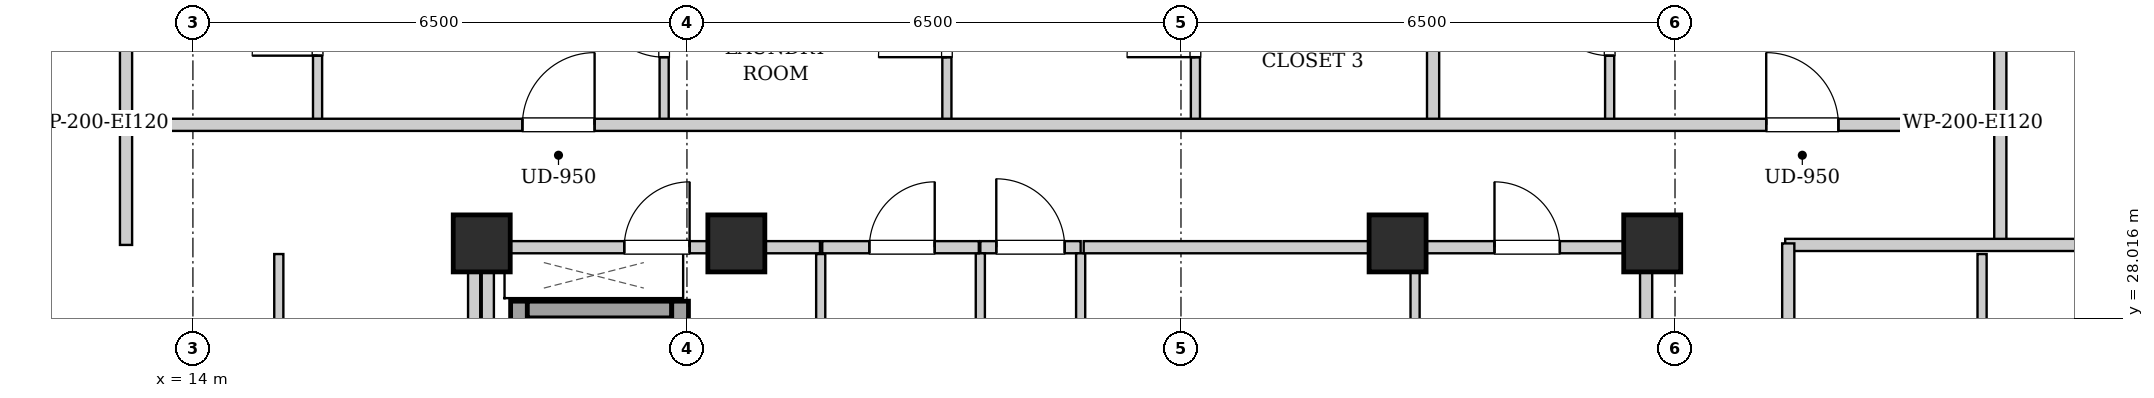
"""IFC4 building model, lengths in metres.
Left out: names, types, materials, properties, quantities, classifications, styles, units other than length and angle.
Written with IfcOpenShell. Run it as: python <this file> out.ifc"""

import sys

from ifc_helpers import new_model, si_unit, direction, frame, frame_2d, origin, origin_2d, place, context, subcontext, project, spatial, rectangle, extrude, element, fill, save


model = new_model("IFC4")
c1 = context("Model", 3, precision=1e-05, world=origin(), true_north=direction((0.0, 1.0)))
c2 = subcontext(c1, "Body", "Model", "MODEL_VIEW")
j1 = project(units=[si_unit("LENGTHUNIT", "METRE"), si_unit("PLANEANGLEUNIT", "RADIAN")], contexts=[c1])
p1 = place(None, origin())
s1 = spatial("IfcSite", under=j1, at=p1, CompositionType="ELEMENT")
p2 = place(p1, origin())
s2 = spatial("IfcBuilding", under=s1, at=p2, CompositionType="ELEMENT")
p3 = place(p2, frame((0.0, 0.0, 224.1)))
s3 = spatial("IfcBuildingStorey", under=s2, at=p3, CompositionType="ELEMENT", Elevation=224.1)
for number, where, z_axis, x_axis in (
    (1, (17.8, 29.0, 0.0), (0.0, 0.0, 1.0), (1.0, 0.0, 0.0)),
    (2, (21.15, 29.0, 0.0), (0.0, 0.0, 1.0), (1.0, 0.0, 0.0)),
    (3, (29.85, 29.0, 0.0), (0.0, 0.0, 1.0), (1.0, 0.0, 0.0)),
    (4, (33.2, 29.0, 0.0), (0.0, 0.0, 1.0), (1.0, 0.0, 0.0)),
):
    element("IfcColumn", number, at=place(p3, frame(where, z_axis=z_axis, x_axis=x_axis)), inside=s3, PredefinedType="COLUMN", context=c2, shape_type="SweptSolid", body=[
        extrude(rectangle(XDim=0.75, YDim=0.75, at=origin_2d()), origin(), (0.0, 0.0, 1.0), 3.4),
    ])
p4 = place(p3, frame((18.29, 24.1, 0.0), z_axis=(0.0, 0.0, 1.0), x_axis=(0.0, 1.0, 0.0)))
e5 = element("IfcWall", 5, at=p4, inside=s3, PredefinedType="SHEAR", context=c2, shape_type="SweptSolid", body=[
    extrude(rectangle(XDim=4.14, YDim=0.22, at=frame_2d((2.07, 0.0))), origin(), (0.0, 0.0, 1.0), 3.14),
])
p5 = place(p3, frame((18.4, 28.13, 0.0), z_axis=(0.0, 0.0, 1.0), x_axis=(1.0, 0.0, 0.0)))
e6 = element("IfcWall", 6, at=p5, inside=s3, PredefinedType="SHEAR", context=c2, shape_type="SweptSolid", body=[
    extrude(rectangle(XDim=1.9, YDim=0.22, at=frame_2d((0.95, 0.0))), origin(), (0.0, 0.0, 1.0), 3.14),
])
p6 = place(p3, frame((20.41, 26.06, 0.0), z_axis=(0.0, 0.0, 1.0), x_axis=(0.0, 1.0, 0.0)))
e7 = element("IfcWall", 7, at=p6, inside=s3, PredefinedType="SHEAR", context=c2, shape_type="SweptSolid", body=[
    extrude(rectangle(XDim=2.18, YDim=0.22, at=frame_2d((1.09, 0.0))), origin(), (0.0, 0.0, 1.0), 3.14),
])
p7 = place(p6, frame((0.54, 0.0, 0.0)))
e8 = element("IfcOpeningElement", 8, at=p7, cuts=e7, PredefinedType="OPENING", context=c2, shape_type="SweptSolid", body=[
    extrude(rectangle(XDim=1.1, YDim=2.15, at=frame_2d((0.55, 1.075))), frame((0.0, 0.12, 0.0), z_axis=(0.0, -1.0, 0.0), x_axis=(1.0, 0.0, 0.0)), (0.0, 0.0, 1.0), 0.24),
])
for number, where, z_axis, x_axis in (
    (9, (17.88, 24.12, 0.0), (0.0, 0.0, 1.0), (0.0, 1.0, 0.0)),
    (10, (33.12, 24.12, 0.0), (0.0, 0.0, 1.0), (0.0, 1.0, 0.0)),
):
    element("IfcWall", number, at=place(p3, frame(where, z_axis=z_axis, x_axis=x_axis)), inside=s3, PredefinedType="PARTITIONING", context=c2, shape_type="SweptSolid", body=[
        extrude(rectangle(XDim=4.76, YDim=0.16, at=frame_2d((2.38, 0.0))), origin(), (0.0, 0.0, 1.0), 3.14),
    ])
p8 = place(p3, frame((24.36, 28.95, 0.0), z_axis=(0.0, 0.0, 1.0), x_axis=(1.0, 0.0, 0.0)))
e11 = element("IfcWall", 11, at=p8, inside=s3, PredefinedType="PARTITIONING", context=c2, shape_type="SweptSolid", body=[
    extrude(rectangle(XDim=1.32, YDim=0.16, at=frame_2d((0.66, 0.0))), origin(), (0.0, 0.0, 1.0), 2.668),
])
p9 = place(p8, frame((0.21, 0.0, 0.0)))
e12 = element("IfcOpeningElement", 12, at=p9, cuts=e11, PredefinedType="OPENING", context=c2, shape_type="SweptSolid", body=[
    extrude(rectangle(XDim=0.9, YDim=2.05, at=frame_2d((0.45, 1.025))), frame((0.0, 0.09, 0.0), z_axis=(0.0, -1.0, 0.0), x_axis=(1.0, 0.0, 0.0)), (0.0, 0.0, 1.0), 0.18),
])
p10 = place(p3, frame((17.96, 28.95, 0.0), z_axis=(0.0, 0.0, 1.0), x_axis=(1.0, 0.0, 0.0)))
e13 = element("IfcWall", 13, at=p10, inside=s3, PredefinedType="PARTITIONING", context=c2, shape_type="SweptSolid", body=[
    extrude(rectangle(XDim=4.29, YDim=0.16, at=frame_2d((2.145, 0.0))), origin(), (0.0, 0.0, 1.0), 2.668),
])
p11 = place(p10, frame((1.715, 0.0, 0.0)))
e14 = element("IfcOpeningElement", 14, at=p11, cuts=e13, PredefinedType="OPENING", context=c2, shape_type="SweptSolid", body=[
    extrude(rectangle(XDim=0.86, YDim=2.05, at=frame_2d((0.43, 1.025))), frame((0.0, 0.09, 0.0), z_axis=(0.0, -1.0, 0.0), x_axis=(1.0, 0.0, 0.0)), (0.0, 0.0, 1.0), 0.18),
])
for number, where, z_axis, x_axis in (
    (15, (24.36, 25.0, 0.0), (0.0, 0.0, 1.0), (0.0, 1.0, 0.0)),
    (16, (25.68, 25.0, 0.0), (0.0, 0.0, 1.0), (0.0, 1.0, 0.0)),
):
    element("IfcWall", number, at=place(p3, frame(where, z_axis=z_axis, x_axis=x_axis)), inside=s3, PredefinedType="PARTITIONING", context=c2, shape_type="SweptSolid", body=[
        extrude(rectangle(XDim=3.87, YDim=0.12, at=frame_2d((1.935, 0.0))), origin(), (0.0, 0.0, 1.0), 3.14),
    ])
p12 = place(p3, frame((30.08, 26.18, 0.0), z_axis=(0.0, 0.0, 1.0), x_axis=(0.0, 1.0, 0.0)))
e17 = element("IfcWall", 17, at=p12, inside=s3, PredefinedType="PARTITIONING", context=c2, shape_type="SweptSolid", body=[
    extrude(rectangle(XDim=2.68, YDim=0.12, at=frame_2d((1.34, 0.0))), origin(), (0.0, 0.0, 1.0), 3.14),
])
p13 = place(p3, frame((30.08, 28.95, 0.0), z_axis=(0.0, 0.0, 1.0), x_axis=(1.0, 0.0, 0.0)))
e18 = element("IfcWall", 18, at=p13, inside=s3, PredefinedType="PARTITIONING", context=c2, shape_type="SweptSolid", body=[
    extrude(rectangle(XDim=2.96, YDim=0.16, at=frame_2d((1.48, 0.0))), origin(), (0.0, 0.0, 1.0), 3.14),
])
p14 = place(p13, frame((1.045, 0.0, 0.0)))
e19 = element("IfcOpeningElement", 19, at=p14, cuts=e18, PredefinedType="OPENING", context=c2, shape_type="SweptSolid", body=[
    extrude(rectangle(XDim=0.86, YDim=2.05, at=frame_2d((0.43, 1.025))), frame((0.0, 0.09, 0.0), z_axis=(0.0, -1.0, 0.0), x_axis=(1.0, 0.0, 0.0)), (0.0, 0.0, 1.0), 0.18),
])
p15 = place(p3, frame((22.26, 25.0, 0.0), z_axis=(0.0, 0.0, 1.0), x_axis=(0.0, 1.0, 0.0)))
e20 = element("IfcWall", 20, at=p15, inside=s3, PredefinedType="PARTITIONING", context=c2, shape_type="SweptSolid", body=[
    extrude(rectangle(XDim=3.86, YDim=0.12, at=frame_2d((1.93, 0.0))), origin(), (0.0, 0.0, 1.0), 3.14),
])
p16 = place(p3, frame((22.28, 28.95, 0.0), z_axis=(0.0, 0.0, 1.0), x_axis=(1.0, 0.0, 0.0)))
e21 = element("IfcWall", 21, at=p16, inside=s3, PredefinedType="PARTITIONING", context=c2, shape_type="SweptSolid", body=[
    extrude(rectangle(XDim=2.06, YDim=0.16, at=frame_2d((1.03, 0.0))), origin(), (0.0, 0.0, 1.0), 2.668),
])
p17 = place(p16, frame((0.62, 0.0, 0.0)))
e22 = element("IfcOpeningElement", 22, at=p17, cuts=e21, PredefinedType="OPENING", context=c2, shape_type="SweptSolid", body=[
    extrude(rectangle(XDim=0.86, YDim=2.05, at=frame_2d((0.43, 1.025))), frame((0.0, 0.09, 0.0), z_axis=(0.0, -1.0, 0.0), x_axis=(1.0, 0.0, 0.0)), (0.0, 0.0, 1.0), 0.18),
])
p18 = place(p3, frame((25.72, 28.95, 0.0), z_axis=(0.0, 0.0, 1.0), x_axis=(1.0, 0.0, 0.0)))
e23 = element("IfcWall", 23, at=p18, inside=s3, PredefinedType="PARTITIONING", context=c2, shape_type="SweptSolid", body=[
    extrude(rectangle(XDim=4.32, YDim=0.16, at=frame_2d((2.16, 0.0))), origin(), (0.0, 0.0, 1.0), 2.668),
])
for number, where, z_axis, x_axis in (
    (24, (13.12, 28.98, 0.0), (0.0, 0.0, 1.0), (0.0, 1.0, 0.0)),
    (25, (37.78, 28.98, 0.0), (0.0, 0.0, 1.0), (0.0, 1.0, 0.0)),
):
    element("IfcWall", number, at=place(p3, frame(where, z_axis=z_axis, x_axis=x_axis)), inside=s3, PredefinedType="PARTITIONING", context=c2, shape_type="SweptSolid", body=[
        extrude(rectangle(XDim=1.58, YDim=0.16, at=frame_2d((0.79, 0.0))), origin(), (0.0, 0.0, 1.0), 3.14),
    ])
p19 = place(p3, frame((34.95, 28.98, 0.0), z_axis=(0.0, 0.0, 1.0), x_axis=(1.0, 0.0, 0.0)))
e26 = element("IfcWall", 26, at=p19, inside=s3, PredefinedType="PARTITIONING", context=c2, shape_type="SweptSolid", body=[
    extrude(rectangle(XDim=5.07, YDim=0.16, at=frame_2d((2.535, 0.0))), origin(), (0.0, 0.0, 1.0), 2.668),
])
p20 = place(p3, frame((13.12, 30.6, 0.0), z_axis=(0.0, 0.0, 1.0), x_axis=(0.0, 1.0, 0.0)))
e27 = element("IfcWall", 27, at=p20, inside=s3, PredefinedType="PARTITIONING", context=c2, shape_type="SweptSolid", body=[
    extrude(rectangle(XDim=2.66, YDim=0.16, at=frame_2d((1.33, 0.0))), origin(), (0.0, 0.0, 1.0), 3.14),
])
p21 = place(p3, frame((15.64, 30.6, 0.0), z_axis=(0.0, 0.0, 1.0), x_axis=(0.0, 1.0, 0.0)))
e28 = element("IfcWall", 28, at=p21, inside=s3, PredefinedType="PARTITIONING", context=c2, shape_type="SweptSolid", body=[
    extrude(rectangle(XDim=2.6, YDim=0.12, at=frame_2d((1.3, 0.0))), origin(), (0.0, 0.0, 1.0), 3.14),
])
p22 = place(p21, frame((0.87, 0.0, 0.0)))
e29 = element("IfcOpeningElement", 29, at=p22, cuts=e28, PredefinedType="OPENING", context=c2, shape_type="SweptSolid", body=[
    extrude(rectangle(XDim=0.86, YDim=2.05, at=frame_2d((0.43, 1.025))), frame((0.0, 0.07, 0.0), z_axis=(0.0, -1.0, 0.0), x_axis=(1.0, 0.0, 0.0)), (0.0, 0.0, 1.0), 0.14),
])
p23 = place(p3, frame((20.2, 30.6, 0.0), z_axis=(0.0, 0.0, 1.0), x_axis=(0.0, 1.0, 0.0)))
e30 = element("IfcWall", 30, at=p23, inside=s3, PredefinedType="PARTITIONING", context=c2, shape_type="SweptSolid", body=[
    extrude(rectangle(XDim=2.6, YDim=0.12, at=frame_2d((1.3, 0.0))), origin(), (0.0, 0.0, 1.0), 3.14),
])
p24 = place(p23, frame((0.85, 0.0, 0.0)))
e31 = element("IfcOpeningElement", 31, at=p24, cuts=e30, PredefinedType="OPENING", context=c2, shape_type="SweptSolid", body=[
    extrude(rectangle(XDim=0.9, YDim=2.05, at=frame_2d((0.45, 1.025))), frame((0.0, 0.07, 0.0), z_axis=(0.0, -1.0, 0.0), x_axis=(1.0, 0.0, 0.0)), (0.0, 0.0, 1.0), 0.14),
])
p25 = place(p3, frame((23.92, 30.6, 0.0), z_axis=(0.0, 0.0, 1.0), x_axis=(0.0, 1.0, 0.0)))
e32 = element("IfcWall", 32, at=p25, inside=s3, PredefinedType="PARTITIONING", context=c2, shape_type="SweptSolid", body=[
    extrude(rectangle(XDim=2.6, YDim=0.12, at=frame_2d((1.3, 0.0))), origin(), (0.0, 0.0, 1.0), 3.14),
])
p26 = place(p25, frame((0.85, 0.0, 0.0)))
e33 = element("IfcOpeningElement", 33, at=p26, cuts=e32, PredefinedType="OPENING", context=c2, shape_type="SweptSolid", body=[
    extrude(rectangle(XDim=0.9, YDim=2.05, at=frame_2d((0.45, 1.025))), frame((0.0, 0.07, 0.0), z_axis=(0.0, -1.0, 0.0), x_axis=(1.0, 0.0, 0.0)), (0.0, 0.0, 1.0), 0.14),
])
p27 = place(p3, frame((27.19, 30.6, 0.0), z_axis=(0.0, 0.0, 1.0), x_axis=(0.0, 1.0, 0.0)))
e34 = element("IfcWall", 34, at=p27, inside=s3, PredefinedType="PARTITIONING", context=c2, shape_type="SweptSolid", body=[
    extrude(rectangle(XDim=2.6, YDim=0.12, at=frame_2d((1.3, 0.0))), origin(), (0.0, 0.0, 1.0), 3.14),
])
p28 = place(p27, frame((0.85, 0.0, 0.0)))
e35 = element("IfcOpeningElement", 35, at=p28, cuts=e34, PredefinedType="OPENING", context=c2, shape_type="SweptSolid", body=[
    extrude(rectangle(XDim=0.9, YDim=2.05, at=frame_2d((0.45, 1.025))), frame((0.0, 0.07, 0.0), z_axis=(0.0, -1.0, 0.0), x_axis=(1.0, 0.0, 0.0)), (0.0, 0.0, 1.0), 0.14),
])
p29 = place(p3, frame((37.78, 30.6, 0.0), z_axis=(0.0, 0.0, 1.0), x_axis=(0.0, 1.0, 0.0)))
e36 = element("IfcWall", 36, at=p29, inside=s3, PredefinedType="PARTITIONING", context=c2, shape_type="SweptSolid", body=[
    extrude(rectangle(XDim=2.66, YDim=0.16, at=frame_2d((1.33, 0.0))), origin(), (0.0, 0.0, 1.0), 3.14),
])
p30 = place(p3, frame((30.317, 30.6, 0.0), z_axis=(0.0, 0.0, 1.0), x_axis=(0.0, 1.0, 0.0)))
e37 = element("IfcWall", 37, at=p30, inside=s3, PredefinedType="PARTITIONING", context=c2, shape_type="SweptSolid", body=[
    extrude(rectangle(XDim=9.32, YDim=0.16, at=frame_2d((4.66, 0.0))), origin(), (0.0, 0.0, 1.0), 3.14),
])
p31 = place(p3, frame((32.64, 30.6, 0.0), z_axis=(0.0, 0.0, 1.0), x_axis=(0.0, 1.0, 0.0)))
e38 = element("IfcWall", 38, at=p31, inside=s3, PredefinedType="PARTITIONING", context=c2, shape_type="SweptSolid", body=[
    extrude(rectangle(XDim=2.6, YDim=0.12, at=frame_2d((1.3, 0.0))), origin(), (0.0, 0.0, 1.0), 3.14),
])
p32 = place(p31, frame((0.87, 0.0, 0.0)))
e39 = element("IfcOpeningElement", 39, at=p32, cuts=e38, PredefinedType="OPENING", context=c2, shape_type="SweptSolid", body=[
    extrude(rectangle(XDim=0.86, YDim=2.05, at=frame_2d((0.43, 1.025))), frame((0.0, 0.07, 0.0), z_axis=(0.0, -1.0, 0.0), x_axis=(1.0, 0.0, 0.0)), (0.0, 0.0, 1.0), 0.14),
])
p33 = place(p3, frame((15.13, 24.552, 0.0), z_axis=(0.0, 0.0, 1.0), x_axis=(0.0, 1.0, 0.0)))
e40 = element("IfcWall", 40, at=p33, inside=s3, PredefinedType="PARTITIONING", context=c2, shape_type="SweptSolid", body=[
    extrude(rectangle(XDim=4.308, YDim=0.12, at=frame_2d((2.154, 0.0))), origin(), (0.0, 0.0, 1.0), 3.14),
])
p34 = place(p33, frame((1.704, 0.0, 0.0)))
e41 = element("IfcOpeningElement", 41, at=p34, cuts=e40, PredefinedType="OPENING", context=c2, shape_type="SweptSolid", body=[
    extrude(rectangle(XDim=0.9, YDim=2.05, at=frame_2d((0.45, 1.025))), frame((0.0, 0.07, 0.0), z_axis=(0.0, -1.0, 0.0), x_axis=(1.0, 0.0, 0.0)), (0.0, 0.0, 1.0), 0.14),
])
p35 = place(p3, frame((37.54, 24.552, 0.0), z_axis=(0.0, 0.0, 1.0), x_axis=(0.0, 1.0, 0.0)))
e42 = element("IfcWall", 42, at=p35, inside=s3, PredefinedType="PARTITIONING", context=c2, shape_type="SweptSolid", body=[
    extrude(rectangle(XDim=4.308, YDim=0.12, at=frame_2d((2.154, 0.0))), origin(), (0.0, 0.0, 1.0), 3.14),
])
p36 = place(p35, frame((1.704, 0.0, 0.0)))
e43 = element("IfcOpeningElement", 43, at=p36, cuts=e42, PredefinedType="OPENING", context=c2, shape_type="SweptSolid", body=[
    extrude(rectangle(XDim=0.9, YDim=2.05, at=frame_2d((0.45, 1.025))), frame((0.0, 0.07, 0.0), z_axis=(0.0, -1.0, 0.0), x_axis=(1.0, 0.0, 0.0)), (0.0, 0.0, 1.0), 0.14),
])
p37 = place(p3, frame((13.15, 30.56, 0.0), z_axis=(0.0, 0.0, 1.0), x_axis=(1.0, 0.0, 0.0)))
e44 = element("IfcWall", 44, at=p37, inside=s3, PredefinedType="PARTITIONING", context=c2, shape_type="SweptSolid", body=[
    extrude(rectangle(XDim=24.6, YDim=0.16, at=frame_2d((12.3, 0.0))), origin(), (0.0, 0.0, 1.0), 3.14),
])
p38 = place(p37, frame((5.185, 0.0, 0.0)))
e45 = element("IfcOpeningElement", 45, at=p38, cuts=e44, PredefinedType="OPENING", context=c2, shape_type="SweptSolid", body=[
    extrude(rectangle(XDim=0.95, YDim=2.1, at=frame_2d((0.475, 1.05))), frame((0.0, 0.09, 0.0), z_axis=(0.0, -1.0, 0.0), x_axis=(1.0, 0.0, 0.0)), (0.0, 0.0, 1.0), 0.18),
])
p39 = place(p37, frame((21.55, 0.0, 0.0)))
e46 = element("IfcOpeningElement", 46, at=p39, cuts=e44, PredefinedType="OPENING", context=c2, shape_type="SweptSolid", body=[
    extrude(rectangle(XDim=0.95, YDim=2.1, at=frame_2d((0.475, 1.05))), frame((0.0, 0.09, 0.0), z_axis=(0.0, -1.0, 0.0), x_axis=(1.0, 0.0, 0.0)), (0.0, 0.0, 1.0), 0.18),
])
p40 = place(p3, frame((17.7, 15.02, 0.0), z_axis=(0.0, 0.0, 1.0), x_axis=(0.0, 1.0, 0.0)))
e47 = element("IfcWall", 47, at=p40, inside=s3, PredefinedType="PARTITIONING", context=c2, shape_type="SweptSolid", body=[
    extrude(rectangle(XDim=13.98, YDim=0.16, at=frame_2d((6.99, 0.0))), origin(), (0.0, 0.0, 1.0), 3.14),
])
p41 = place(p3, frame((34.99, 15.07, 0.0), z_axis=(0.0, 0.0, 1.0), x_axis=(0.0, 1.0, 0.0)))
e48 = element("IfcWall", 48, at=p41, inside=s3, PredefinedType="PARTITIONING", context=c2, shape_type="SweptSolid", body=[
    extrude(rectangle(XDim=13.93, YDim=0.16, at=frame_2d((6.965, 0.0))), origin(), (0.0, 0.0, 1.0), 3.14),
])
p42 = place(p41, frame((4.385, 0.0, 0.0)))
e49 = element("IfcOpeningElement", 49, at=p42, cuts=e48, PredefinedType="OPENING", context=c2, shape_type="SweptSolid", body=[
    extrude(rectangle(XDim=0.95, YDim=2.1, at=frame_2d((0.475, 1.05))), frame((0.0, 0.09, 0.0), z_axis=(0.0, -1.0, 0.0), x_axis=(1.0, 0.0, 0.0)), (0.0, 0.0, 1.0), 0.18),
])
p43 = place(p9, origin())
e50 = element("IfcDoor", 50, at=p43, inside=s3, OperationType="SINGLE_SWING_LEFT", PredefinedType="DOOR", context=c2, shape_type="SweptSolid", body=[
    extrude(rectangle(XDim=0.9, YDim=2.05, at=frame_2d((0.45, 1.025))), frame((0.0, 0.025, 0.0), z_axis=(0.0, -1.0, 0.0), x_axis=(1.0, 0.0, 0.0)), (0.0, 0.0, 1.0), 0.05),
])
fill(e12, e50)
p44 = place(p11, origin())
e51 = element("IfcDoor", 51, at=p44, inside=s3, OperationType="SINGLE_SWING_RIGHT", PredefinedType="DOOR", context=c2, shape_type="SweptSolid", body=[
    extrude(rectangle(XDim=0.86, YDim=2.05, at=frame_2d((0.43, 1.025))), frame((0.0, 0.025, 0.0), z_axis=(0.0, -1.0, 0.0), x_axis=(1.0, 0.0, 0.0)), (0.0, 0.0, 1.0), 0.05),
])
fill(e14, e51)
p45 = place(p14, origin())
e52 = element("IfcDoor", 52, at=p45, inside=s3, OperationType="SINGLE_SWING_LEFT", PredefinedType="DOOR", context=c2, shape_type="SweptSolid", body=[
    extrude(rectangle(XDim=0.86, YDim=2.05, at=frame_2d((0.43, 1.025))), frame((0.0, 0.025, 0.0), z_axis=(0.0, -1.0, 0.0), x_axis=(1.0, 0.0, 0.0)), (0.0, 0.0, 1.0), 0.05),
])
fill(e19, e52)
p46 = place(p17, origin())
e53 = element("IfcDoor", 53, at=p46, inside=s3, OperationType="SINGLE_SWING_RIGHT", PredefinedType="DOOR", context=c2, shape_type="SweptSolid", body=[
    extrude(rectangle(XDim=0.86, YDim=2.05, at=frame_2d((0.43, 1.025))), frame((0.0, 0.025, 0.0), z_axis=(0.0, -1.0, 0.0), x_axis=(1.0, 0.0, 0.0)), (0.0, 0.0, 1.0), 0.05),
])
fill(e22, e53)
p47 = place(p22, origin())
e54 = element("IfcDoor", 54, at=p47, inside=s3, OperationType="SINGLE_SWING_LEFT", PredefinedType="DOOR", context=c2, shape_type="SweptSolid", body=[
    extrude(rectangle(XDim=0.86, YDim=2.05, at=frame_2d((0.43, 1.025))), frame((0.0, 0.025, 0.0), z_axis=(0.0, -1.0, 0.0), x_axis=(1.0, 0.0, 0.0)), (0.0, 0.0, 1.0), 0.05),
])
fill(e29, e54)
p48 = place(p24, origin())
e55 = element("IfcDoor", 55, at=p48, inside=s3, OperationType="SINGLE_SWING_RIGHT", PredefinedType="DOOR", context=c2, shape_type="SweptSolid", body=[
    extrude(rectangle(XDim=0.9, YDim=2.05, at=frame_2d((0.45, 1.025))), frame((0.0, 0.025, 0.0), z_axis=(0.0, -1.0, 0.0), x_axis=(1.0, 0.0, 0.0)), (0.0, 0.0, 1.0), 0.05),
])
fill(e31, e55)
p49 = place(p26, origin())
e56 = element("IfcDoor", 56, at=p49, inside=s3, OperationType="SINGLE_SWING_LEFT", PredefinedType="DOOR", context=c2, shape_type="SweptSolid", body=[
    extrude(rectangle(XDim=0.9, YDim=2.05, at=frame_2d((0.45, 1.025))), frame((0.0, 0.025, 0.0), z_axis=(0.0, -1.0, 0.0), x_axis=(1.0, 0.0, 0.0)), (0.0, 0.0, 1.0), 0.05),
])
fill(e33, e56)
p50 = place(p28, origin())
e57 = element("IfcDoor", 57, at=p50, inside=s3, OperationType="SINGLE_SWING_LEFT", PredefinedType="DOOR", context=c2, shape_type="SweptSolid", body=[
    extrude(rectangle(XDim=0.9, YDim=2.05, at=frame_2d((0.45, 1.025))), frame((0.0, 0.025, 0.0), z_axis=(0.0, -1.0, 0.0), x_axis=(1.0, 0.0, 0.0)), (0.0, 0.0, 1.0), 0.05),
])
fill(e35, e57)
p51 = place(p32, origin())
e58 = element("IfcDoor", 58, at=p51, inside=s3, OperationType="SINGLE_SWING_RIGHT", PredefinedType="DOOR", context=c2, shape_type="SweptSolid", body=[
    extrude(rectangle(XDim=0.86, YDim=2.05, at=frame_2d((0.43, 1.025))), frame((0.0, 0.025, 0.0), z_axis=(0.0, -1.0, 0.0), x_axis=(1.0, 0.0, 0.0)), (0.0, 0.0, 1.0), 0.05),
])
fill(e39, e58)
p52 = place(p38, origin())
e59 = element("IfcDoor", 59, at=p52, inside=s3, OperationType="SINGLE_SWING_RIGHT", PredefinedType="DOOR", context=c2, shape_type="SweptSolid", body=[
    extrude(rectangle(XDim=0.95, YDim=2.1, at=frame_2d((0.475, 1.05))), frame((0.0, 0.025, 0.0), z_axis=(0.0, -1.0, 0.0), x_axis=(1.0, 0.0, 0.0)), (0.0, 0.0, 1.0), 0.05),
])
fill(e45, e59)
p53 = place(p39, origin())
e60 = element("IfcDoor", 60, at=p53, inside=s3, OperationType="SINGLE_SWING_LEFT", PredefinedType="DOOR", context=c2, shape_type="SweptSolid", body=[
    extrude(rectangle(XDim=0.95, YDim=2.1, at=frame_2d((0.475, 1.05))), frame((0.0, 0.025, 0.0), z_axis=(0.0, -1.0, 0.0), x_axis=(1.0, 0.0, 0.0)), (0.0, 0.0, 1.0), 0.05),
])
fill(e46, e60)
save(model, sys.argv[1])
